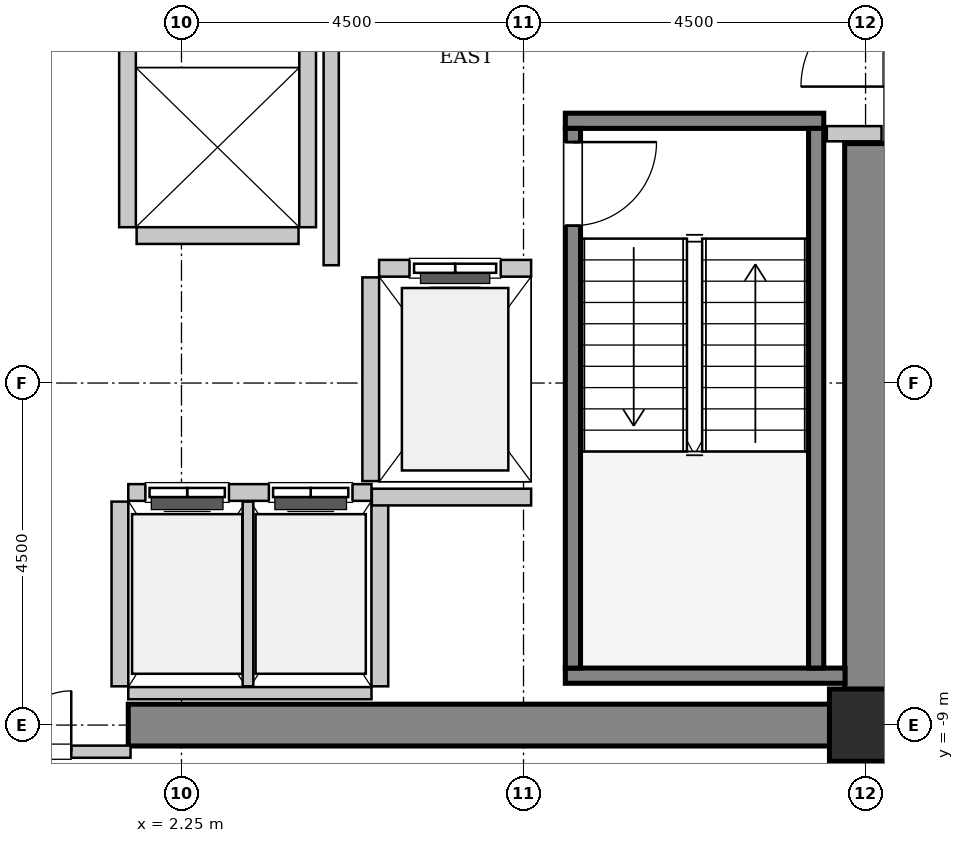
"""IFC4 building model, lengths in metres.
Left out: names, types, materials, properties, quantities, classifications, styles, units other than length and angle.
Written with IfcOpenShell. Run it as: python <this file> out.ifc"""

import sys

from ifc_helpers import new_model, si_unit, direction, frame, frame_2d, origin, origin_2d, place, context, subcontext, project, spatial, rectangle, hollow_rectangle, extrude, source, transform, mapped, element, fill, save


model = new_model("IFC4")
c1 = context("Model", 3, precision=1e-05, world=origin(), true_north=direction((0.0, 1.0)))
c2 = subcontext(c1, "Body", "Model", "MODEL_VIEW")
j1 = project(units=[si_unit("LENGTHUNIT", "METRE"), si_unit("PLANEANGLEUNIT", "RADIAN")], contexts=[c1])
p1 = place(None, origin())
s1 = spatial("IfcSite", under=j1, at=p1, CompositionType="ELEMENT")
p2 = place(p1, origin())
s2 = spatial("IfcBuilding", under=s1, at=p2, CompositionType="ELEMENT")
p3 = place(p2, frame((0.0, 0.0, 156.4)))
s3 = spatial("IfcBuildingStorey", under=s2, at=p3, CompositionType="ELEMENT", Elevation=156.4)
m1 = source(origin(), c2, "Body", "SweptSolid", [
    extrude(rectangle(XDim=9.975, YDim=0.55, at=frame_2d((4.987, 0.0))), origin(), (0.0, 0.0, 1.0), 3.8),
])
p4 = place(p3, frame((1.55, -9.0, 0.0), z_axis=(0.0, 0.0, 1.0), x_axis=(1.0, 0.0, 0.0)))
e1 = element("IfcWall", 1, at=p4, inside=s3, PredefinedType="SHEAR", context=c2, shape_type="MappedRepresentation", body=[
    mapped(m1, transform((0.0, 0.0, 0.0), x_axis=(1.0, 0.0, 0.0), y_axis=(0.0, 1.0, 0.0), z_axis=(0.0, 0.0, 1.0), scale=1.0)),
])
m2 = source(origin(), c2, "Body", "SweptSolid", [
    extrude(rectangle(XDim=7.375, YDim=0.55, at=frame_2d((3.688, 0.0))), origin(), (0.0, 0.0, 1.0), 3.8),
])
p5 = place(p3, frame((11.25, -8.725, 0.0), z_axis=(0.0, 0.0, 1.0), x_axis=(0.0, 1.0, 0.0)))
e2 = element("IfcWall", 2, at=p5, inside=s3, PredefinedType="SHEAR", context=c2, shape_type="MappedRepresentation", body=[
    mapped(m2, transform((0.0, 0.0, 0.0), x_axis=(1.0, 0.0, 0.0), y_axis=(0.0, 1.0, 0.0), z_axis=(0.0, 0.0, 1.0), scale=1.0)),
])
m3 = source(origin(), c2, "Body", "SweptSolid", [
    extrude(hollow_rectangle(XDim=0.95, YDim=0.95, WallThickness=0.045, InnerFilletRadius=0.045, OuterFilletRadius=0.09, at=origin_2d()), origin(), (0.0, 0.0, 1.0), 3.8),
])
p6 = place(p3, frame((11.25, -9.0, 0.0), z_axis=(0.0, 0.0, 1.0), x_axis=(1.0, 0.0, 0.0)))
e3 = element("IfcColumn", 3, at=p6, inside=s3, PredefinedType="COLUMN", context=c2, shape_type="MappedRepresentation", body=[
    mapped(m3, transform((0.0, 0.0, 0.0), x_axis=(1.0, 0.0, 0.0), y_axis=(0.0, 1.0, 0.0), z_axis=(0.0, 0.0, 1.0), scale=1.0)),
])
m4 = source(origin(), c2, "Body", "SweptSolid", [
    extrude(rectangle(XDim=3.4, YDim=0.2, at=frame_2d((1.7, 0.0))), origin(), (0.0, 0.0, 1.0), 3.8),
])
p7 = place(p3, frame((7.3, -1.05, 0.0), z_axis=(0.0, 0.0, 1.0), x_axis=(1.0, 0.0, 0.0)))
e4 = element("IfcWall", 4, at=p7, inside=s3, PredefinedType="SOLIDWALL", context=c2, shape_type="MappedRepresentation", body=[
    mapped(m4, transform((0.0, 0.0, 0.0), x_axis=(1.0, 0.0, 0.0), y_axis=(0.0, 1.0, 0.0), z_axis=(0.0, 0.0, 1.0), scale=1.0)),
])
m5 = source(origin(), c2, "Body", "SweptSolid", [
    extrude(rectangle(XDim=3.68, YDim=0.2, at=frame_2d((1.84, 0.0))), origin(), (0.0, 0.0, 1.0), 3.8),
])
p8 = place(p3, frame((7.3, -8.35, 0.0), z_axis=(0.0, 0.0, 1.0), x_axis=(1.0, 0.0, 0.0)))
e5 = element("IfcWall", 5, at=p8, inside=s3, PredefinedType="SOLIDWALL", context=c2, shape_type="MappedRepresentation", body=[
    mapped(m5, transform((0.0, 0.0, 0.0), x_axis=(1.0, 0.0, 0.0), y_axis=(0.0, 1.0, 0.0), z_axis=(0.0, 0.0, 1.0), scale=1.0)),
])
m6 = source(origin(), c2, "Body", "SweptSolid", [
    extrude(rectangle(XDim=7.1, YDim=0.2, at=frame_2d((3.55, 0.0))), origin(), (0.0, 0.0, 1.0), 3.8),
])
p9 = place(p3, frame((7.4, -1.15, 0.0), z_axis=(0.0, 0.0, 1.0), x_axis=(0.0, -1.0, 0.0)))
e6 = element("IfcWall", 6, at=p9, inside=s3, PredefinedType="SOLIDWALL", context=c2, shape_type="MappedRepresentation", body=[
    mapped(m6, transform((0.0, 0.0, 0.0), x_axis=(1.0, 0.0, 0.0), y_axis=(0.0, 1.0, 0.0), z_axis=(0.0, 0.0, 1.0), scale=1.0)),
])
p10 = place(p9, frame((0.18, 0.0, 0.0)))
e7 = element("IfcOpeningElement", 7, at=p10, cuts=e6, PredefinedType="OPENING", context=c2, shape_type="SweptSolid", body=[
    extrude(rectangle(XDim=1.1, YDim=2.15, at=frame_2d((0.55, 1.075))), frame((0.0, 0.11, 0.0), z_axis=(0.0, -1.0, 0.0), x_axis=(1.0, 0.0, 0.0)), (0.0, 0.0, 1.0), 0.22),
])
p11 = place(p3, frame((10.6, -1.15, 0.0), z_axis=(0.0, 0.0, 1.0), x_axis=(0.0, -1.0, 0.0)))
e8 = element("IfcWall", 8, at=p11, inside=s3, PredefinedType="SOLIDWALL", context=c2, shape_type="MappedRepresentation", body=[
    mapped(m6, transform((0.0, 0.0, 0.0), x_axis=(1.0, 0.0, 0.0), y_axis=(0.0, 1.0, 0.0), z_axis=(0.0, 0.0, 1.0), scale=1.0)),
])
m7 = source(origin(), c2, "Body", "SweptSolid", [
    extrude(rectangle(XDim=2.0, YDim=0.22, at=frame_2d((1.0, 0.0))), origin(), (0.0, 0.0, 1.0), 3.535),
])
p12 = place(p3, frame((6.85, -2.99, 0.0), z_axis=(0.0, 0.0, 1.0), x_axis=(-1.0, 0.0, 0.0)))
e9 = element("IfcWall", 9, at=p12, inside=s3, PredefinedType="SOLIDWALL", context=c2, shape_type="MappedRepresentation", body=[
    mapped(m7, transform((0.0, 0.0, 0.0), x_axis=(1.0, 0.0, 0.0), y_axis=(0.0, 1.0, 0.0), z_axis=(0.0, 0.0, 1.0), scale=1.0)),
])
p13 = place(p12, frame((0.4, 0.0, 0.0)))
e10 = element("IfcOpeningElement", 10, at=p13, cuts=e9, PredefinedType="OPENING", context=c2, shape_type="SweptSolid", body=[
    extrude(rectangle(XDim=1.2, YDim=2.2, at=frame_2d((0.6, 1.1))), frame((0.0, 0.12, 0.0), z_axis=(0.0, -1.0, 0.0), x_axis=(1.0, 0.0, 0.0)), (0.0, 0.0, 1.0), 0.24),
])
m8 = source(origin(), c2, "Body", "SweptSolid", [
    extrude(rectangle(XDim=2.68, YDim=0.22, at=frame_2d((1.34, 0.0))), origin(), (0.0, 0.0, 1.0), 3.535),
])
p14 = place(p3, frame((4.74, -3.11, 0.0), z_axis=(0.0, 0.0, 1.0), x_axis=(0.0, -1.0, 0.0)))
e11 = element("IfcWall", 11, at=p14, inside=s3, PredefinedType="SOLIDWALL", context=c2, shape_type="MappedRepresentation", body=[
    mapped(m8, transform((0.0, 0.0, 0.0), x_axis=(1.0, 0.0, 0.0), y_axis=(0.0, 1.0, 0.0), z_axis=(0.0, 0.0, 1.0), scale=1.0)),
])
m9 = source(origin(), c2, "Body", "SweptSolid", [
    extrude(rectangle(XDim=3.2, YDim=0.22, at=frame_2d((1.6, 0.0))), origin(), (0.0, 0.0, 1.0), 3.535),
])
p15 = place(p3, frame((4.75, -5.94, 0.0), z_axis=(0.0, 0.0, 1.0), x_axis=(-1.0, 0.0, 0.0)))
e12 = element("IfcWall", 12, at=p15, inside=s3, PredefinedType="SOLIDWALL", context=c2, shape_type="MappedRepresentation", body=[
    mapped(m9, transform((0.0, 0.0, 0.0), x_axis=(1.0, 0.0, 0.0), y_axis=(0.0, 1.0, 0.0), z_axis=(0.0, 0.0, 1.0), scale=1.0)),
])
p16 = place(p15, frame((1.875, 0.0, 0.0)))
e13 = element("IfcOpeningElement", 13, at=p16, cuts=e12, PredefinedType="OPENING", context=c2, shape_type="SweptSolid", body=[
    extrude(rectangle(XDim=1.1, YDim=2.2, at=frame_2d((0.55, 1.1))), frame((0.0, 0.12, 0.0), z_axis=(0.0, -1.0, 0.0), x_axis=(1.0, 0.0, 0.0)), (0.0, 0.0, 1.0), 0.24),
])
p17 = place(p15, frame((0.25, 0.0, 0.0)))
e14 = element("IfcOpeningElement", 14, at=p17, cuts=e12, PredefinedType="OPENING", context=c2, shape_type="SweptSolid", body=[
    extrude(rectangle(XDim=1.1, YDim=2.2, at=frame_2d((0.55, 1.1))), frame((0.0, 0.12, 0.0), z_axis=(0.0, -1.0, 0.0), x_axis=(1.0, 0.0, 0.0)), (0.0, 0.0, 1.0), 0.24),
])
m10 = source(origin(), c2, "Body", "SweptSolid", [
    extrude(rectangle(XDim=3.2, YDim=0.16, at=frame_2d((1.6, 0.0))), origin(), (0.0, 0.0, 1.0), 2.425),
])
p18 = place(p3, frame((1.55, -8.58, 0.0), z_axis=(0.0, 0.0, 1.0), x_axis=(1.0, 0.0, 0.0)))
e15 = element("IfcWall", 15, at=p18, inside=s3, PredefinedType="PARTITIONING", context=c2, shape_type="MappedRepresentation", body=[
    mapped(m10, transform((0.0, 0.0, 0.0), x_axis=(1.0, 0.0, 0.0), y_axis=(0.0, 1.0, 0.0), z_axis=(0.0, 0.0, 1.0), scale=1.0)),
])
m11 = source(origin(), c2, "Body", "SweptSolid", [
    extrude(rectangle(XDim=2.43, YDim=0.22, at=frame_2d((1.215, 0.0))), origin(), (0.0, 0.0, 1.0), 3.535),
])
p19 = place(p3, frame((1.44, -6.06, 0.0), z_axis=(0.0, 0.0, 1.0), x_axis=(0.0, -1.0, 0.0)))
e16 = element("IfcWall", 16, at=p19, inside=s3, PredefinedType="SOLIDWALL", context=c2, shape_type="MappedRepresentation", body=[
    mapped(m11, transform((0.0, 0.0, 0.0), x_axis=(1.0, 0.0, 0.0), y_axis=(0.0, 1.0, 0.0), z_axis=(0.0, 0.0, 1.0), scale=1.0)),
])
m12 = source(origin(), c2, "Body", "SweptSolid", [
    extrude(rectangle(XDim=2.43, YDim=0.14, at=frame_2d((1.215, 0.0))), origin(), (0.0, 0.0, 1.0), 3.535),
])
p20 = place(p3, frame((3.125, -8.49, 0.0), z_axis=(0.0, 0.0, 1.0), x_axis=(0.0, 1.0, 0.0)))
e17 = element("IfcWall", 17, at=p20, inside=s3, PredefinedType="PARTITIONING", context=c2, shape_type="MappedRepresentation", body=[
    mapped(m12, transform((0.0, 0.0, 0.0), x_axis=(1.0, 0.0, 0.0), y_axis=(0.0, 1.0, 0.0), z_axis=(0.0, 0.0, 1.0), scale=1.0)),
])
p21 = place(p3, frame((4.86, -8.49, 0.0), z_axis=(0.0, 0.0, 1.0), x_axis=(0.0, 1.0, 0.0)))
e18 = element("IfcWall", 18, at=p21, inside=s3, PredefinedType="SOLIDWALL", context=c2, shape_type="MappedRepresentation", body=[
    mapped(m11, transform((0.0, 0.0, 0.0), x_axis=(1.0, 0.0, 0.0), y_axis=(0.0, 1.0, 0.0), z_axis=(0.0, 0.0, 1.0), scale=1.0)),
])
m13 = source(origin(), c2, "Body", "SweptSolid", [
    extrude(rectangle(XDim=4.9, YDim=0.22, at=frame_2d((2.45, 0.0))), origin(), (0.0, 0.0, 1.0), 3.535),
])
for number, where, z_axis, x_axis in (
    (19, (1.54, 2.45, 0.0), (0.0, 0.0, 1.0), (0.0, -1.0, 0.0)),
    (20, (3.91, -2.45, 0.0), (0.0, 0.0, 1.0), (0.0, 1.0, 0.0)),
):
    element("IfcWall", number, at=place(p3, frame(where, z_axis=z_axis, x_axis=x_axis)), inside=s3, PredefinedType="SOLIDWALL", context=c2, shape_type="MappedRepresentation", body=[
        mapped(m13, transform((0.0, 0.0, 0.0), x_axis=(1.0, 0.0, 0.0), y_axis=(0.0, 1.0, 0.0), z_axis=(0.0, 0.0, 1.0), scale=1.0)),
    ])
m14 = source(origin(), c2, "Body", "SweptSolid", [
    extrude(rectangle(XDim=2.13, YDim=0.22, at=frame_2d((1.065, 0.0))), origin(), (0.0, 0.0, 1.0), 3.535),
])
p22 = place(p3, frame((1.66, -2.56, 0.0), z_axis=(0.0, 0.0, 1.0), x_axis=(1.0, 0.0, 0.0)))
e21 = element("IfcWall", 21, at=p22, inside=s3, PredefinedType="SOLIDWALL", context=c2, shape_type="MappedRepresentation", body=[
    mapped(m14, transform((0.0, 0.0, 0.0), x_axis=(1.0, 0.0, 0.0), y_axis=(0.0, 1.0, 0.0), z_axis=(0.0, 0.0, 1.0), scale=1.0)),
])
m15 = source(origin(), c2, "Body", "SweptSolid", [
    extrude(rectangle(XDim=2.095, YDim=0.22, at=frame_2d((1.048, 0.0))), origin(), (0.0, 0.0, 1.0), 3.535),
])
p23 = place(p3, frame((4.755, -6.0, 0.0), z_axis=(0.0, 0.0, 1.0), x_axis=(1.0, 0.0, 0.0)))
e22 = element("IfcWall", 22, at=p23, inside=s3, PredefinedType="SOLIDWALL", context=c2, shape_type="MappedRepresentation", body=[
    mapped(m15, transform((0.0, 0.0, 0.0), x_axis=(1.0, 0.0, 0.0), y_axis=(0.0, 1.0, 0.0), z_axis=(0.0, 0.0, 1.0), scale=1.0)),
])
m16 = source(origin(), c2, "Body", "SweptSolid", [
    extrude(rectangle(XDim=5.9, YDim=0.2, at=frame_2d((2.95, 0.0))), origin(), (0.0, 0.0, 1.0), 3.535),
])
p24 = place(p3, frame((4.22, -2.95, 0.0), z_axis=(0.0, 0.0, 1.0), x_axis=(0.0, 1.0, 0.0)))
e23 = element("IfcWall", 23, at=p24, inside=s3, PredefinedType="PARTITIONING", context=c2, shape_type="MappedRepresentation", body=[
    mapped(m16, transform((0.0, 0.0, 0.0), x_axis=(1.0, 0.0, 0.0), y_axis=(0.0, 1.0, 0.0), z_axis=(0.0, 0.0, 1.0), scale=1.0)),
])
m17 = source(origin(), c2, "Body", "SweptSolid", [
    extrude(rectangle(XDim=0.72, YDim=0.2, at=frame_2d((0.36, 0.0))), origin(), (0.0, 0.0, 1.0), 3.535),
])
p25 = place(p3, frame((10.74, -1.22, 0.0), z_axis=(0.0, 0.0, 1.0), x_axis=(1.0, 0.0, 0.0)))
e24 = element("IfcWall", 24, at=p25, inside=s3, PredefinedType="PARTITIONING", context=c2, shape_type="MappedRepresentation", body=[
    mapped(m17, transform((0.0, 0.0, 0.0), x_axis=(1.0, 0.0, 0.0), y_axis=(0.0, 1.0, 0.0), z_axis=(0.0, 0.0, 1.0), scale=1.0)),
])
m18 = source(origin(), c2, "Body", "SweptSolid", [
    extrude(rectangle(XDim=3.16, YDim=0.16, at=frame_2d((1.58, 0.0))), origin(), (0.0, 0.0, 1.0), 2.425),
])
p26 = place(p3, frame((-1.58, -9.35, 0.0), z_axis=(0.0, 0.0, 1.0), x_axis=(1.0, 0.0, 0.0)))
e25 = element("IfcWall", 25, at=p26, inside=s3, PredefinedType="PARTITIONING", context=c2, shape_type="MappedRepresentation", body=[
    mapped(m18, transform((0.0, 0.0, 0.0), x_axis=(1.0, 0.0, 0.0), y_axis=(0.0, 1.0, 0.0), z_axis=(0.0, 0.0, 1.0), scale=1.0)),
])
p27 = place(p26, frame((0.78, 0.0, 0.0)))
e26 = element("IfcOpeningElement", 26, at=p27, cuts=e25, PredefinedType="OPENING", context=c2, shape_type="SweptSolid", body=[
    extrude(rectangle(XDim=1.6, YDim=2.3, at=frame_2d((0.8, 1.15))), frame((0.0, 0.09, 0.0), z_axis=(0.0, -1.0, 0.0), x_axis=(1.0, 0.0, 0.0)), (0.0, 0.0, 1.0), 0.18),
])
m19 = source(origin(), c2, "Body", "SweptSolid", [
    extrude(rectangle(XDim=1.1, YDim=2.15, at=frame_2d((0.55, 1.075))), frame((0.0, 0.025, 0.0), z_axis=(0.0, -1.0, 0.0), x_axis=(1.0, 0.0, 0.0)), (0.0, 0.0, 1.0), 0.05),
])
p28 = place(p10, origin())
e27 = element("IfcDoor", 27, at=p28, inside=s3, OperationType="SINGLE_SWING_LEFT", PredefinedType="DOOR", context=c2, shape_type="MappedRepresentation", body=[
    mapped(m19, transform((0.0, 0.0, 0.0), x_axis=(1.0, 0.0, 0.0), y_axis=(0.0, 1.0, 0.0), z_axis=(0.0, 0.0, 1.0), scale=1.0)),
])
fill(e7, e27)
m20 = source(origin(), c2, "Body", "SweptSolid", [
    extrude(rectangle(XDim=1.2, YDim=2.2, at=frame_2d((0.6, 1.1))), frame((0.0, 0.025, 0.0), z_axis=(0.0, -1.0, 0.0), x_axis=(1.0, 0.0, 0.0)), (0.0, 0.0, 1.0), 0.05),
])
p29 = place(p13, origin())
e28 = element("IfcDoor", 28, at=p29, inside=s3, OperationType="SLIDING_TO_LEFT", PredefinedType="DOOR", context=c2, shape_type="MappedRepresentation", body=[
    mapped(m20, transform((0.0, 0.0, 0.0), x_axis=(1.0, 0.0, 0.0), y_axis=(0.0, 1.0, 0.0), z_axis=(0.0, 0.0, 1.0), scale=1.0)),
])
fill(e10, e28)
m21 = source(origin(), c2, "Body", "SweptSolid", [
    extrude(rectangle(XDim=1.1, YDim=2.2, at=frame_2d((0.55, 1.1))), frame((0.0, 0.025, 0.0), z_axis=(0.0, -1.0, 0.0), x_axis=(1.0, 0.0, 0.0)), (0.0, 0.0, 1.0), 0.05),
])
p30 = place(p16, origin())
e29 = element("IfcDoor", 29, at=p30, inside=s3, OperationType="DOUBLE_DOOR_SLIDING", PredefinedType="DOOR", context=c2, shape_type="MappedRepresentation", body=[
    mapped(m21, transform((0.0, 0.0, 0.0), x_axis=(1.0, 0.0, 0.0), y_axis=(0.0, 1.0, 0.0), z_axis=(0.0, 0.0, 1.0), scale=1.0)),
])
fill(e13, e29)
p31 = place(p17, origin())
e30 = element("IfcDoor", 30, at=p31, inside=s3, OperationType="DOUBLE_DOOR_SLIDING", PredefinedType="DOOR", context=c2, shape_type="MappedRepresentation", body=[
    mapped(m21, transform((0.0, 0.0, 0.0), x_axis=(1.0, 0.0, 0.0), y_axis=(0.0, 1.0, 0.0), z_axis=(0.0, 0.0, 1.0), scale=1.0)),
])
fill(e14, e30)
m22 = source(origin(), c2, "Body", "SweptSolid", [
    extrude(rectangle(XDim=1.6, YDim=2.3, at=frame_2d((0.8, 1.15))), frame((0.0, 0.025, 0.0), z_axis=(0.0, -1.0, 0.0), x_axis=(1.0, 0.0, 0.0)), (0.0, 0.0, 1.0), 0.05),
])
p32 = place(p27, origin())
e31 = element("IfcDoor", 31, at=p32, inside=s3, OperationType="DOUBLE_DOOR_SINGLE_SWING", PredefinedType="DOOR", context=c2, shape_type="MappedRepresentation", body=[
    mapped(m22, transform((0.0, 0.0, 0.0), x_axis=(1.0, 0.0, 0.0), y_axis=(0.0, 1.0, 0.0), z_axis=(0.0, 0.0, 1.0), scale=1.0)),
])
fill(e26, e31)
save(model, sys.argv[1])
